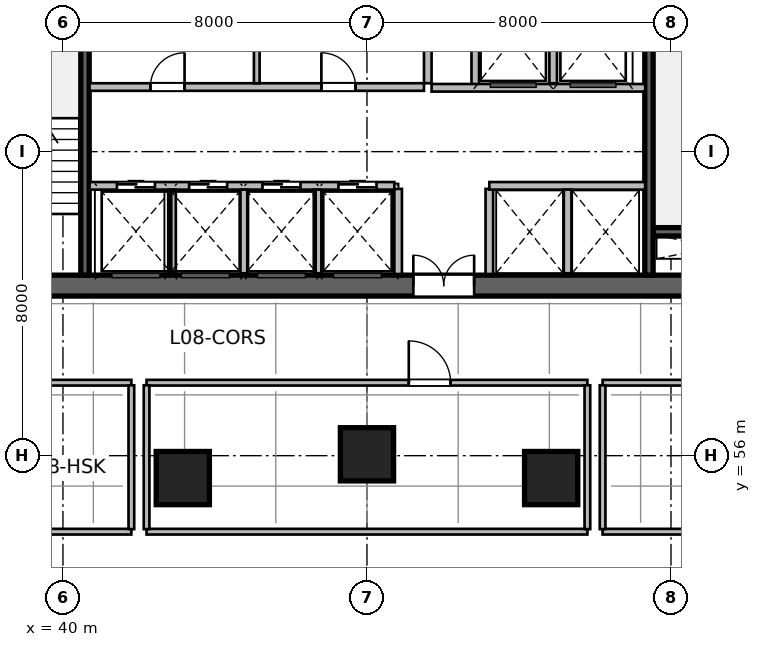
"""IFC4 building model, lengths in metres.
Left out: names, types, materials, properties, quantities, classifications, styles, units other than length and angle.
Written with IfcOpenShell. Run it as: python <this file> out.ifc"""

import sys

from ifc_helpers import new_model, si_unit, direction, frame, frame_2d, origin, origin_2d, place, context, subcontext, project, spatial, rectangle, circle, extrude, source, transform, mapped, element, fill, save


model = new_model("IFC4")
c1 = context("Model", 3, precision=1e-05, world=origin(), true_north=direction((0.0, 1.0)))
c2 = subcontext(c1, "Body", "Model", "MODEL_VIEW")
j1 = project(units=[si_unit("LENGTHUNIT", "METRE"), si_unit("PLANEANGLEUNIT", "RADIAN")], contexts=[c1])
p1 = place(None, origin())
s1 = spatial("IfcSite", under=j1, at=p1, CompositionType="ELEMENT")
p2 = place(p1, origin())
s2 = spatial("IfcBuilding", under=s1, at=p2, CompositionType="ELEMENT")
p3 = place(p2, frame((0.0, 0.0, 42.6)))
s3 = spatial("IfcBuildingStorey", under=s2, at=p3, CompositionType="ELEMENT", Elevation=42.6)
m1 = source(origin(), c2, "Body", "SweptSolid", [
    extrude(rectangle(XDim=21.6, YDim=0.55, at=frame_2d((10.8, 0.0))), origin(), (0.0, 0.0, 1.0), 3.6),
])
p4 = place(p3, frame((37.2, 60.475, 0.0), z_axis=(0.0, 0.0, 1.0), x_axis=(1.0, 0.0, 0.0)))
e1 = element("IfcWall", 1, at=p4, inside=s3, PredefinedType="SHEAR", context=c2, shape_type="MappedRepresentation", body=[
    mapped(m1, transform((0.0, 0.0, 0.0), scale=1.0)),
])
p5 = place(p4, frame((1.1, 0.0, 0.0)))
e2 = element("IfcOpeningElement", 2, at=p5, cuts=e1, PredefinedType="OPENING", context=c2, shape_type="SweptSolid", body=[
    extrude(rectangle(XDim=1.15, YDim=2.15, at=frame_2d((0.575, 1.075))), frame((0.0, 0.285, 0.0), z_axis=(0.0, -1.0, 0.0), x_axis=(1.0, 0.0, 0.0)), (0.0, 0.0, 1.0), 0.57),
])
p6 = place(p4, frame((19.5, 0.0, 0.0)))
e3 = element("IfcOpeningElement", 3, at=p6, cuts=e1, PredefinedType="OPENING", context=c2, shape_type="SweptSolid", body=[
    extrude(rectangle(XDim=0.9, YDim=2.1, at=frame_2d((0.45, 1.05))), frame((0.0, 0.285, 0.0), z_axis=(0.0, -1.0, 0.0), x_axis=(1.0, 0.0, 0.0)), (0.0, 0.0, 1.0), 0.57),
])
p7 = place(p4, frame((12.02, 0.0, 0.0)))
e4 = element("IfcOpeningElement", 4, at=p7, cuts=e1, PredefinedType="OPENING", context=c2, shape_type="SweptSolid", body=[
    extrude(rectangle(XDim=1.6, YDim=2.15, at=frame_2d((0.8, 1.075))), frame((0.0, 0.285, 0.0), z_axis=(0.0, -1.0, 0.0), x_axis=(1.0, 0.0, 0.0)), (0.0, 0.0, 1.0), 0.57),
])
m2 = source(origin(), c2, "Body", "SweptSolid", [
    extrude(rectangle(XDim=3.27, YDim=0.22, at=frame_2d((1.635, 0.0))), origin(), (0.0, 0.0, 1.0), 3.6),
])
p8 = place(p3, frame((55.53, 61.89, 0.0), z_axis=(0.0, 0.0, 1.0), x_axis=(1.0, 0.0, 0.0)))
e5 = element("IfcWall", 5, at=p8, inside=s3, PredefinedType="SHEAR", context=c2, shape_type="MappedRepresentation", body=[
    mapped(m2, transform((0.0, 0.0, 0.0), scale=1.0)),
])
m3 = source(origin(), c2, "Body", "SweptSolid", [
    extrude(rectangle(XDim=10.9, YDim=0.22, at=frame_2d((5.45, 0.0))), origin(), (0.0, 0.0, 1.0), 3.6),
])
p9 = place(p3, frame((40.58, 60.75, 0.0), z_axis=(0.0, 0.0, 1.0), x_axis=(0.0, 1.0, 0.0)))
e6 = element("IfcWall", 6, at=p9, inside=s3, PredefinedType="SHEAR", context=c2, shape_type="MappedRepresentation", body=[
    mapped(m3, transform((0.0, 0.0, 0.0), scale=1.0)),
])
p10 = place(p3, frame((55.42, 60.75, 0.0), z_axis=(0.0, 0.0, 1.0), x_axis=(0.0, 1.0, 0.0)))
e7 = element("IfcWall", 7, at=p10, inside=s3, PredefinedType="SHEAR", context=c2, shape_type="MappedRepresentation", body=[
    mapped(m3, transform((0.0, 0.0, 0.0), scale=1.0)),
])
p11 = place(p10, frame((9.495, 0.0, 0.0)))
e8 = element("IfcOpeningElement", 8, at=p11, cuts=e7, PredefinedType="OPENING", context=c2, shape_type="SweptSolid", body=[
    extrude(rectangle(XDim=1.15, YDim=2.15, at=frame_2d((0.575, 1.075))), frame((0.0, 0.12, 0.0), z_axis=(0.0, -1.0, 0.0), x_axis=(1.0, 0.0, 0.0)), (0.0, 0.0, 1.0), 0.24),
])
m4 = source(origin(), c2, "Body", "SweptSolid", [
    extrude(circle(Radius=0.7, at=origin_2d()), origin(), (0.0, 0.0, 1.0), 3.6),
])
for number, where, z_axis, x_axis in (
    (9, (43.154, 55.411, 0.0), (0.0, 0.0, 1.0), (-0.143, 0.99, 0.0)),
    (10, (48.0, 56.036, 0.0), (0.0, 0.0, 1.0), (0.0, 1.0, 0.0)),
    (11, (52.846, 55.411, 0.0), (0.0, 0.0, 1.0), (0.143, 0.99, 0.0)),
):
    element("IfcColumn", number, at=place(p3, frame(where, z_axis=z_axis, x_axis=x_axis)), inside=s3, PredefinedType="COLUMN", context=c2, shape_type="MappedRepresentation", body=[
        mapped(m4, transform((0.0, 0.0, 0.0), scale=1.0)),
    ])
m5 = source(origin(), c2, "Body", "SweptSolid", [
    extrude(rectangle(XDim=2.24, YDim=0.2, at=frame_2d((1.12, 0.0))), origin(), (0.0, 0.0, 1.0), 3.36),
])
for number, where, z_axis, x_axis in (
    (12, (48.82, 60.78, 0.0), (0.0, 0.0, 1.0), (0.0, 1.0, 0.0)),
    (13, (51.22, 60.78, 0.0), (0.0, 0.0, 1.0), (0.0, 1.0, 0.0)),
):
    element("IfcWall", number, at=place(p3, frame(where, z_axis=z_axis, x_axis=x_axis)), inside=s3, PredefinedType="SOLIDWALL", context=c2, shape_type="MappedRepresentation", body=[
        mapped(m5, transform((0.0, 0.0, 0.0), scale=1.0)),
    ])
m6 = source(origin(), c2, "Body", "SweptSolid", [
    extrude(rectangle(XDim=5.8, YDim=0.2, at=frame_2d((2.9, 0.0))), origin(), (0.0, 0.0, 1.0), 3.36),
])
p12 = place(p3, frame((49.6, 65.8, 0.0), z_axis=(0.0, 0.0, 1.0), x_axis=(0.0, 1.0, 0.0)))
e14 = element("IfcWall", 14, at=p12, inside=s3, PredefinedType="SOLIDWALL", context=c2, shape_type="MappedRepresentation", body=[
    mapped(m6, transform((0.0, 0.0, 0.0), scale=1.0)),
])
m7 = source(origin(), c2, "Body", "SweptSolid", [
    extrude(rectangle(XDim=2.58, YDim=0.2, at=frame_2d((1.29, 0.0))), origin(), (0.0, 0.0, 1.0), 3.36),
])
p13 = place(p3, frame((50.85, 65.68, 0.0), z_axis=(0.0, 0.0, 1.0), x_axis=(0.0, 1.0, 0.0)))
e15 = element("IfcWall", 15, at=p13, inside=s3, PredefinedType="SOLIDWALL", context=c2, shape_type="MappedRepresentation", body=[
    mapped(m7, transform((0.0, 0.0, 0.0), scale=1.0)),
])
m8 = source(origin(), c2, "Body", "SweptSolid", [
    extrude(rectangle(XDim=2.4, YDim=0.2, at=frame_2d((1.2, 0.0))), origin(), (0.0, 0.0, 1.0), 3.36),
])
p14 = place(p3, frame((52.9, 65.8, 0.0), z_axis=(0.0, 0.0, 1.0), x_axis=(0.0, 1.0, 0.0)))
e16 = element("IfcWall", 16, at=p14, inside=s3, PredefinedType="SOLIDWALL", context=c2, shape_type="MappedRepresentation", body=[
    mapped(m8, transform((0.0, 0.0, 0.0), scale=1.0)),
])
m9 = source(origin(), c2, "Body", "SweptSolid", [
    extrude(rectangle(XDim=5.62, YDim=0.2, at=frame_2d((2.81, 0.0))), origin(), (0.0, 0.0, 1.0), 3.36),
])
p15 = place(p3, frame((49.7, 65.68, 0.0), z_axis=(0.0, 0.0, 1.0), x_axis=(1.0, 0.0, 0.0)))
e17 = element("IfcWall", 17, at=p15, inside=s3, PredefinedType="SOLIDWALL", context=c2, shape_type="MappedRepresentation", body=[
    mapped(m9, transform((0.0, 0.0, 0.0), scale=1.0)),
])
m10 = source(origin(), c2, "Body", "SweptSolid", [
    extrude(rectangle(XDim=8.02, YDim=0.2, at=frame_2d((4.01, 0.0))), origin(), (0.0, 0.0, 1.0), 3.36),
])
p16 = place(p3, frame((40.7, 63.1, 0.0), z_axis=(0.0, 0.0, 1.0), x_axis=(1.0, 0.0, 0.0)))
e18 = element("IfcWall", 18, at=p16, inside=s3, PredefinedType="SOLIDWALL", context=c2, shape_type="MappedRepresentation", body=[
    mapped(m10, transform((0.0, 0.0, 0.0), scale=1.0)),
])
p17 = place(p16, frame((0.72, 0.0, 0.0)))
e19 = element("IfcOpeningElement", 19, at=p17, cuts=e18, PredefinedType="OPENING", context=c2, shape_type="SweptSolid", body=[
    extrude(rectangle(XDim=1.0, YDim=2.15, at=frame_2d((0.5, 1.075))), frame((0.0, 0.11, 0.0), z_axis=(0.0, -1.0, 0.0), x_axis=(1.0, 0.0, 0.0)), (0.0, 0.0, 1.0), 0.22),
])
p18 = place(p16, frame((2.62, 0.0, 0.0)))
e20 = element("IfcOpeningElement", 20, at=p18, cuts=e18, PredefinedType="OPENING", context=c2, shape_type="SweptSolid", body=[
    extrude(rectangle(XDim=1.0, YDim=2.15, at=frame_2d((0.5, 1.075))), frame((0.0, 0.11, 0.0), z_axis=(0.0, -1.0, 0.0), x_axis=(1.0, 0.0, 0.0)), (0.0, 0.0, 1.0), 0.22),
])
p19 = place(p16, frame((4.55, 0.0, 0.0)))
e21 = element("IfcOpeningElement", 21, at=p19, cuts=e18, PredefinedType="OPENING", context=c2, shape_type="SweptSolid", body=[
    extrude(rectangle(XDim=1.0, YDim=2.15, at=frame_2d((0.5, 1.075))), frame((0.0, 0.11, 0.0), z_axis=(0.0, -1.0, 0.0), x_axis=(1.0, 0.0, 0.0)), (0.0, 0.0, 1.0), 0.22),
])
p20 = place(p16, frame((6.55, 0.0, 0.0)))
e22 = element("IfcOpeningElement", 22, at=p20, cuts=e18, PredefinedType="OPENING", context=c2, shape_type="SweptSolid", body=[
    extrude(rectangle(XDim=1.0, YDim=2.15, at=frame_2d((0.5, 1.075))), frame((0.0, 0.11, 0.0), z_axis=(0.0, -1.0, 0.0), x_axis=(1.0, 0.0, 0.0)), (0.0, 0.0, 1.0), 0.22),
])
m11 = source(origin(), c2, "Body", "SweptSolid", [
    extrude(rectangle(XDim=4.1, YDim=0.2, at=frame_2d((2.05, 0.0))), origin(), (0.0, 0.0, 1.0), 3.36),
])
p21 = place(p3, frame((51.22, 63.1, 0.0), z_axis=(0.0, 0.0, 1.0), x_axis=(1.0, 0.0, 0.0)))
e23 = element("IfcWall", 23, at=p21, inside=s3, PredefinedType="SOLIDWALL", context=c2, shape_type="MappedRepresentation", body=[
    mapped(m11, transform((0.0, 0.0, 0.0), scale=1.0)),
])
m12 = source(origin(), c2, "Body", "SweptSolid", [
    extrude(rectangle(XDim=2.2, YDim=0.2, at=frame_2d((1.1, 0.0))), origin(), (0.0, 0.0, 1.0), 3.36),
])
for number, where, z_axis, x_axis in (
    (24, (42.87, 60.8, 0.0), (0.0, 0.0, 1.0), (0.0, 1.0, 0.0)),
    (25, (44.77, 60.8, 0.0), (0.0, 0.0, 1.0), (0.0, 1.0, 0.0)),
    (26, (46.7, 60.8, 0.0), (0.0, 0.0, 1.0), (0.0, 1.0, 0.0)),
    (27, (53.28, 60.8, 0.0), (0.0, 0.0, 1.0), (0.0, 1.0, 0.0)),
):
    element("IfcWall", number, at=place(p3, frame(where, z_axis=z_axis, x_axis=x_axis)), inside=s3, PredefinedType="SOLIDWALL", context=c2, shape_type="MappedRepresentation", body=[
        mapped(m12, transform((0.0, 0.0, 0.0), scale=1.0)),
    ])
m13 = source(origin(), c2, "Body", "SweptSolid", [
    extrude(rectangle(XDim=8.8, YDim=0.2, at=frame_2d((4.4, 0.0))), origin(), (0.0, 0.0, 1.0), 3.36),
])
p22 = place(p3, frame((40.7, 65.7, 0.0), z_axis=(0.0, 0.0, 1.0), x_axis=(1.0, 0.0, 0.0)))
e28 = element("IfcWall", 28, at=p22, inside=s3, PredefinedType="SOLIDWALL", context=c2, shape_type="MappedRepresentation", body=[
    mapped(m13, transform((0.0, 0.0, 0.0), scale=1.0)),
])
p23 = place(p22, frame((1.6, 0.0, 0.0)))
e29 = element("IfcOpeningElement", 29, at=p23, cuts=e28, PredefinedType="OPENING", context=c2, shape_type="SweptSolid", body=[
    extrude(rectangle(XDim=0.9, YDim=2.1, at=frame_2d((0.45, 1.05))), frame((0.0, 0.11, 0.0), z_axis=(0.0, -1.0, 0.0), x_axis=(1.0, 0.0, 0.0)), (0.0, 0.0, 1.0), 0.22),
])
p24 = place(p22, frame((6.1, 0.0, 0.0)))
e30 = element("IfcOpeningElement", 30, at=p24, cuts=e28, PredefinedType="OPENING", context=c2, shape_type="SweptSolid", body=[
    extrude(rectangle(XDim=0.9, YDim=2.1, at=frame_2d((0.45, 1.05))), frame((0.0, 0.11, 0.0), z_axis=(0.0, -1.0, 0.0), x_axis=(1.0, 0.0, 0.0)), (0.0, 0.0, 1.0), 0.22),
])
m14 = source(origin(), c2, "Body", "SweptSolid", [
    extrude(rectangle(XDim=2.4, YDim=0.15, at=frame_2d((1.2, 0.0))), origin(), (0.0, 0.0, 1.0), 3.36),
])
p25 = place(p3, frame((45.1, 65.8, 0.0), z_axis=(0.0, 0.0, 1.0), x_axis=(0.0, 1.0, 0.0)))
e31 = element("IfcWall", 31, at=p25, inside=s3, PredefinedType="PARTITIONING", context=c2, shape_type="MappedRepresentation", body=[
    mapped(m14, transform((0.0, 0.0, 0.0), scale=1.0)),
])
m15 = source(origin(), c2, "Body", "SweptSolid", [
    extrude(rectangle(XDim=6.6, YDim=0.15, at=frame_2d((3.3, 0.0))), origin(), (0.0, 0.0, 1.0), 2.803),
])
p26 = place(p3, frame((35.2, 54.0, 0.0), z_axis=(0.0, 0.0, 1.0), x_axis=(1.0, 0.0, 0.0)))
e32 = element("IfcWall", 32, at=p26, inside=s3, PredefinedType="PARTITIONING", context=c2, shape_type="MappedRepresentation", body=[
    mapped(m15, transform((0.0, 0.0, 0.0), scale=1.0)),
])
m16 = source(origin(), c2, "Body", "SweptSolid", [
    extrude(rectangle(XDim=6.6, YDim=0.15, at=frame_2d((3.3, 0.0))), origin(), (0.0, 0.0, 1.0), 3.36),
])
p27 = place(p3, frame((35.2, 57.92, 0.0), z_axis=(0.0, 0.0, 1.0), x_axis=(1.0, 0.0, 0.0)))
e33 = element("IfcWall", 33, at=p27, inside=s3, PredefinedType="PARTITIONING", context=c2, shape_type="MappedRepresentation", body=[
    mapped(m16, transform((0.0, 0.0, 0.0), scale=1.0)),
])
p28 = place(p27, frame((2.85, 0.0, 0.0)))
e34 = element("IfcOpeningElement", 34, at=p28, cuts=e33, PredefinedType="OPENING", context=c2, shape_type="SweptSolid", body=[
    extrude(rectangle(XDim=0.9, YDim=2.1, at=frame_2d((0.45, 1.05))), frame((0.0, 0.085, 0.0), z_axis=(0.0, -1.0, 0.0), x_axis=(1.0, 0.0, 0.0)), (0.0, 0.0, 1.0), 0.17),
])
m17 = source(origin(), c2, "Body", "SweptSolid", [
    extrude(rectangle(XDim=3.785, YDim=0.15, at=frame_2d((1.893, 0.0))), origin(), (0.0, 0.0, 1.0), 3.36),
])
p29 = place(p3, frame((41.8, 54.067, 0.0), z_axis=(0.0, 0.0, 1.0), x_axis=(0.0, 1.0, 0.0)))
e35 = element("IfcWall", 35, at=p29, inside=s3, PredefinedType="PARTITIONING", context=c2, shape_type="MappedRepresentation", body=[
    mapped(m17, transform((0.0, 0.0, 0.0), scale=1.0)),
])
m18 = source(origin(), c2, "Body", "SweptSolid", [
    extrude(rectangle(XDim=11.6, YDim=0.15, at=frame_2d((5.8, 0.0))), origin(), (0.0, 0.0, 1.0), 3.36),
])
p30 = place(p3, frame((42.2, 54.0, 0.0), z_axis=(0.0, 0.0, 1.0), x_axis=(1.0, 0.0, 0.0)))
e36 = element("IfcWall", 36, at=p30, inside=s3, PredefinedType="PARTITIONING", context=c2, shape_type="MappedRepresentation", body=[
    mapped(m18, transform((0.0, 0.0, 0.0), scale=1.0)),
])
p31 = place(p3, frame((42.2, 57.92, 0.0), z_axis=(0.0, 0.0, 1.0), x_axis=(1.0, 0.0, 0.0)))
e37 = element("IfcWall", 37, at=p31, inside=s3, PredefinedType="PARTITIONING", context=c2, shape_type="MappedRepresentation", body=[
    mapped(m18, transform((0.0, 0.0, 0.0), scale=1.0)),
])
p32 = place(p31, frame((6.9, 0.0, 0.0)))
e38 = element("IfcOpeningElement", 38, at=p32, cuts=e37, PredefinedType="OPENING", context=c2, shape_type="SweptSolid", body=[
    extrude(rectangle(XDim=1.1, YDim=2.15, at=frame_2d((0.55, 1.075))), frame((0.0, 0.085, 0.0), z_axis=(0.0, -1.0, 0.0), x_axis=(1.0, 0.0, 0.0)), (0.0, 0.0, 1.0), 0.17),
])
for number, where, z_axis, x_axis in (
    (39, (42.2, 54.067, 0.0), (0.0, 0.0, 1.0), (0.0, 1.0, 0.0)),
    (40, (53.8, 54.067, 0.0), (0.0, 0.0, 1.0), (0.0, 1.0, 0.0)),
):
    element("IfcWall", number, at=place(p3, frame(where, z_axis=z_axis, x_axis=x_axis)), inside=s3, PredefinedType="PARTITIONING", context=c2, shape_type="MappedRepresentation", body=[
        mapped(m17, transform((0.0, 0.0, 0.0), scale=1.0)),
    ])
p33 = place(p3, frame((54.2, 54.0, 0.0), z_axis=(0.0, 0.0, 1.0), x_axis=(1.0, 0.0, 0.0)))
e41 = element("IfcWall", 41, at=p33, inside=s3, PredefinedType="PARTITIONING", context=c2, shape_type="MappedRepresentation", body=[
    mapped(m15, transform((0.0, 0.0, 0.0), scale=1.0)),
])
p34 = place(p3, frame((54.2, 57.92, 0.0), z_axis=(0.0, 0.0, 1.0), x_axis=(1.0, 0.0, 0.0)))
e42 = element("IfcWall", 42, at=p34, inside=s3, PredefinedType="PARTITIONING", context=c2, shape_type="MappedRepresentation", body=[
    mapped(m16, transform((0.0, 0.0, 0.0), scale=1.0)),
])
p35 = place(p34, frame((2.825, 0.0, 0.0)))
e43 = element("IfcOpeningElement", 43, at=p35, cuts=e42, PredefinedType="OPENING", context=c2, shape_type="SweptSolid", body=[
    extrude(rectangle(XDim=0.95, YDim=2.1, at=frame_2d((0.475, 1.05))), frame((0.0, 0.085, 0.0), z_axis=(0.0, -1.0, 0.0), x_axis=(1.0, 0.0, 0.0)), (0.0, 0.0, 1.0), 0.17),
])
p36 = place(p3, frame((54.2, 54.067, 0.0), z_axis=(0.0, 0.0, 1.0), x_axis=(0.0, 1.0, 0.0)))
e44 = element("IfcWall", 44, at=p36, inside=s3, PredefinedType="PARTITIONING", context=c2, shape_type="MappedRepresentation", body=[
    mapped(m17, transform((0.0, 0.0, 0.0), scale=1.0)),
])
m19 = source(origin(), c2, "Body", "SweptSolid", [
    extrude(rectangle(XDim=1.6, YDim=2.15, at=frame_2d((0.8, 1.075))), frame((0.0, 0.025, 0.0), z_axis=(0.0, -1.0, 0.0), x_axis=(1.0, 0.0, 0.0)), (0.0, 0.0, 1.0), 0.05),
])
p37 = place(p7, origin())
e45 = element("IfcDoor", 45, at=p37, inside=s3, OperationType="DOUBLE_DOOR_SINGLE_SWING", PredefinedType="DOOR", context=c2, shape_type="MappedRepresentation", body=[
    mapped(m19, transform((0.0, 0.0, 0.0), scale=1.0)),
])
fill(e4, e45)
m20 = source(origin(), c2, "Body", "SweptSolid", [
    extrude(rectangle(XDim=1.0, YDim=2.15, at=frame_2d((0.5, 1.075))), frame((0.0, 0.025, 0.0), z_axis=(0.0, -1.0, 0.0), x_axis=(1.0, 0.0, 0.0)), (0.0, 0.0, 1.0), 0.05),
])
p38 = place(p17, origin())
e46 = element("IfcDoor", 46, at=p38, inside=s3, OperationType="DOUBLE_DOOR_SLIDING", PredefinedType="DOOR", context=c2, shape_type="MappedRepresentation", body=[
    mapped(m20, transform((0.0, 0.0, 0.0), scale=1.0)),
])
fill(e19, e46)
p39 = place(p18, origin())
e47 = element("IfcDoor", 47, at=p39, inside=s3, OperationType="DOUBLE_DOOR_SLIDING", PredefinedType="DOOR", context=c2, shape_type="MappedRepresentation", body=[
    mapped(m20, transform((0.0, 0.0, 0.0), scale=1.0)),
])
fill(e20, e47)
p40 = place(p19, origin())
e48 = element("IfcDoor", 48, at=p40, inside=s3, OperationType="DOUBLE_DOOR_SLIDING", PredefinedType="DOOR", context=c2, shape_type="MappedRepresentation", body=[
    mapped(m20, transform((0.0, 0.0, 0.0), scale=1.0)),
])
fill(e21, e48)
p41 = place(p20, origin())
e49 = element("IfcDoor", 49, at=p41, inside=s3, OperationType="DOUBLE_DOOR_SLIDING", PredefinedType="DOOR", context=c2, shape_type="MappedRepresentation", body=[
    mapped(m20, transform((0.0, 0.0, 0.0), scale=1.0)),
])
fill(e22, e49)
m21 = source(origin(), c2, "Body", "SweptSolid", [
    extrude(rectangle(XDim=0.9, YDim=2.1, at=frame_2d((0.45, 1.05))), frame((0.0, 0.025, 0.0), z_axis=(0.0, -1.0, 0.0), x_axis=(1.0, 0.0, 0.0)), (0.0, 0.0, 1.0), 0.05),
])
p42 = place(p23, origin())
e50 = element("IfcDoor", 50, at=p42, inside=s3, OperationType="SINGLE_SWING_RIGHT", PredefinedType="DOOR", context=c2, shape_type="MappedRepresentation", body=[
    mapped(m21, transform((0.0, 0.0, 0.0), scale=1.0)),
])
fill(e29, e50)
p43 = place(p24, origin())
e51 = element("IfcDoor", 51, at=p43, inside=s3, OperationType="SINGLE_SWING_LEFT", PredefinedType="DOOR", context=c2, shape_type="MappedRepresentation", body=[
    mapped(m21, transform((0.0, 0.0, 0.0), scale=1.0)),
])
fill(e30, e51)
m22 = source(origin(), c2, "Body", "SweptSolid", [
    extrude(rectangle(XDim=1.1, YDim=2.15, at=frame_2d((0.55, 1.075))), frame((0.0, 0.025, 0.0), z_axis=(0.0, -1.0, 0.0), x_axis=(1.0, 0.0, 0.0)), (0.0, 0.0, 1.0), 0.05),
])
p44 = place(p32, origin())
e52 = element("IfcDoor", 52, at=p44, inside=s3, OperationType="SINGLE_SWING_LEFT", PredefinedType="DOOR", context=c2, shape_type="MappedRepresentation", body=[
    mapped(m22, transform((0.0, 0.0, 0.0), scale=1.0)),
])
fill(e38, e52)
save(model, sys.argv[1])
